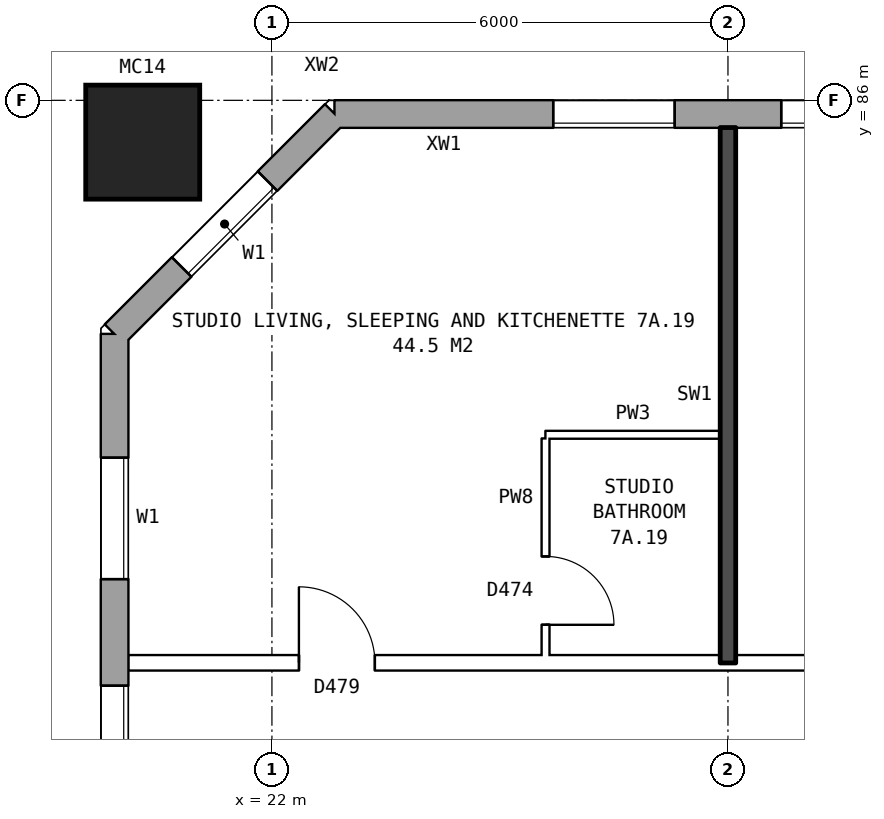
"""IFC4 building model, lengths in metres.
Left out: names, types, materials, properties, quantities, classifications, styles, units other than length and angle.
Written with IfcOpenShell. Run it as: python <this file> out.ifc"""

import sys

from ifc_helpers import new_model, si_unit, direction, frame, frame_2d, origin, origin_2d, place, context, subcontext, project, spatial, rectangle, hollow_rectangle, extrude, element, fill, save


model = new_model("IFC4")
c1 = context("Model", 3, precision=1e-05, world=origin(), true_north=direction((0.0, 1.0)))
c2 = subcontext(c1, "Body", "Model", "MODEL_VIEW")
j1 = project(units=[si_unit("LENGTHUNIT", "METRE"), si_unit("PLANEANGLEUNIT", "RADIAN")], contexts=[c1])
p1 = place(None, origin())
s1 = spatial("IfcSite", under=j1, at=p1, CompositionType="ELEMENT")
p2 = place(p1, origin())
s2 = spatial("IfcBuilding", under=s1, at=p2, CompositionType="ELEMENT")
p3 = place(p2, frame((0.0, 0.0, 28.8)))
s3 = spatial("IfcBuildingStorey", under=s2, at=p3, CompositionType="ELEMENT", Elevation=28.8)
p4 = place(p3, frame((20.3, 85.45, 0.0), z_axis=(0.0, 0.0, 1.0), x_axis=(1.0, 0.0, 0.0)))
e1 = element("IfcColumn", 1, at=p4, inside=s3, PredefinedType="COLUMN", context=c2, shape_type="SweptSolid", body=[
    extrude(hollow_rectangle(XDim=1.5, YDim=1.5, WallThickness=0.08, at=origin_2d()), origin(), (0.0, 0.0, 1.0), 3.1),
])
p5 = place(p3, frame((72.925, 85.82, 0.0), z_axis=(0.0, 0.0, 1.0), x_axis=(-1.0, 0.0, 0.0)))
e2 = element("IfcWall", 2, at=p5, inside=s3, PredefinedType="STANDARD", context=c2, shape_type="SweptSolid", body=[
    extrude(rectangle(XDim=50.101, YDim=0.36, at=frame_2d((25.05, 0.0))), origin(), (0.0, 0.0, 1.0), 2.85),
])
p6 = place(p5, frame((0.625, 0.0, 0.8)))
e3 = element("IfcOpeningElement", 3, at=p6, cuts=e2, PredefinedType="OPENING", context=c2, shape_type="SweptSolid", body=[
    extrude(rectangle(XDim=1.6, YDim=1.8, at=frame_2d((0.8, 0.9))), frame((0.0, 0.19, 0.0), z_axis=(0.0, -1.0, 0.0), x_axis=(1.0, 0.0, 0.0)), (0.0, 0.0, 1.0), 0.38),
])
p7 = place(p5, frame((3.625, 0.0, 0.8)))
e4 = element("IfcOpeningElement", 4, at=p7, cuts=e2, PredefinedType="OPENING", context=c2, shape_type="SweptSolid", body=[
    extrude(rectangle(XDim=1.6, YDim=1.8, at=frame_2d((0.8, 0.9))), frame((0.0, 0.19, 0.0), z_axis=(0.0, -1.0, 0.0), x_axis=(1.0, 0.0, 0.0)), (0.0, 0.0, 1.0), 0.38),
])
p8 = place(p5, frame((6.625, 0.0, 0.8)))
e5 = element("IfcOpeningElement", 5, at=p8, cuts=e2, PredefinedType="OPENING", context=c2, shape_type="SweptSolid", body=[
    extrude(rectangle(XDim=1.6, YDim=1.8, at=frame_2d((0.8, 0.9))), frame((0.0, 0.19, 0.0), z_axis=(0.0, -1.0, 0.0), x_axis=(1.0, 0.0, 0.0)), (0.0, 0.0, 1.0), 0.38),
])
p9 = place(p5, frame((9.625, 0.0, 0.8)))
e6 = element("IfcOpeningElement", 6, at=p9, cuts=e2, PredefinedType="OPENING", context=c2, shape_type="SweptSolid", body=[
    extrude(rectangle(XDim=1.6, YDim=1.8, at=frame_2d((0.8, 0.9))), frame((0.0, 0.19, 0.0), z_axis=(0.0, -1.0, 0.0), x_axis=(1.0, 0.0, 0.0)), (0.0, 0.0, 1.0), 0.38),
])
p10 = place(p5, frame((12.075, 0.0, 1.65)))
e7 = element("IfcOpeningElement", 7, at=p10, cuts=e2, PredefinedType="OPENING", context=c2, shape_type="SweptSolid", body=[
    extrude(rectangle(XDim=1.2, YDim=0.9, at=frame_2d((0.6, 0.45))), frame((0.0, 0.19, 0.0), z_axis=(0.0, -1.0, 0.0), x_axis=(1.0, 0.0, 0.0)), (0.0, 0.0, 1.0), 0.38),
])
p11 = place(p5, frame((15.325, 0.0, 0.8)))
e8 = element("IfcOpeningElement", 8, at=p11, cuts=e2, PredefinedType="OPENING", context=c2, shape_type="SweptSolid", body=[
    extrude(rectangle(XDim=0.6, YDim=1.2, at=frame_2d((0.3, 0.6))), frame((0.0, 0.19, 0.0), z_axis=(0.0, -1.0, 0.0), x_axis=(1.0, 0.0, 0.0)), (0.0, 0.0, 1.0), 0.38),
])
p12 = place(p5, frame((18.625, 0.0, 0.8)))
e9 = element("IfcOpeningElement", 9, at=p12, cuts=e2, PredefinedType="OPENING", context=c2, shape_type="SweptSolid", body=[
    extrude(rectangle(XDim=1.6, YDim=1.8, at=frame_2d((0.8, 0.9))), frame((0.0, 0.19, 0.0), z_axis=(0.0, -1.0, 0.0), x_axis=(1.0, 0.0, 0.0)), (0.0, 0.0, 1.0), 0.38),
])
p13 = place(p5, frame((21.625, 0.0, 0.8)))
e10 = element("IfcOpeningElement", 10, at=p13, cuts=e2, PredefinedType="OPENING", context=c2, shape_type="SweptSolid", body=[
    extrude(rectangle(XDim=1.6, YDim=1.8, at=frame_2d((0.8, 0.9))), frame((0.0, 0.19, 0.0), z_axis=(0.0, -1.0, 0.0), x_axis=(1.0, 0.0, 0.0)), (0.0, 0.0, 1.0), 0.38),
])
p14 = place(p5, frame((24.625, 0.0, 0.8)))
e11 = element("IfcOpeningElement", 11, at=p14, cuts=e2, PredefinedType="OPENING", context=c2, shape_type="SweptSolid", body=[
    extrude(rectangle(XDim=1.6, YDim=1.8, at=frame_2d((0.8, 0.9))), frame((0.0, 0.19, 0.0), z_axis=(0.0, -1.0, 0.0), x_axis=(1.0, 0.0, 0.0)), (0.0, 0.0, 1.0), 0.38),
])
p15 = place(p5, frame((27.625, 0.0, 0.8)))
e12 = element("IfcOpeningElement", 12, at=p15, cuts=e2, PredefinedType="OPENING", context=c2, shape_type="SweptSolid", body=[
    extrude(rectangle(XDim=1.6, YDim=1.8, at=frame_2d((0.8, 0.9))), frame((0.0, 0.19, 0.0), z_axis=(0.0, -1.0, 0.0), x_axis=(1.0, 0.0, 0.0)), (0.0, 0.0, 1.0), 0.38),
])
p16 = place(p5, frame((30.625, 0.0, 0.8)))
e13 = element("IfcOpeningElement", 13, at=p16, cuts=e2, PredefinedType="OPENING", context=c2, shape_type="SweptSolid", body=[
    extrude(rectangle(XDim=1.6, YDim=1.8, at=frame_2d((0.8, 0.9))), frame((0.0, 0.19, 0.0), z_axis=(0.0, -1.0, 0.0), x_axis=(1.0, 0.0, 0.0)), (0.0, 0.0, 1.0), 0.38),
])
p17 = place(p5, frame((33.125, 0.0, 0.8)))
e14 = element("IfcOpeningElement", 14, at=p17, cuts=e2, PredefinedType="OPENING", context=c2, shape_type="SweptSolid", body=[
    extrude(rectangle(XDim=1.2, YDim=1.5, at=frame_2d((0.6, 0.75))), frame((0.0, 0.19, 0.0), z_axis=(0.0, -1.0, 0.0), x_axis=(1.0, 0.0, 0.0)), (0.0, 0.0, 1.0), 0.38),
])
p18 = place(p5, frame((36.675, 0.0, 1.7)))
e15 = element("IfcOpeningElement", 15, at=p18, cuts=e2, PredefinedType="OPENING", context=c2, shape_type="SweptSolid", body=[
    extrude(rectangle(XDim=0.6, YDim=0.9, at=frame_2d((0.3, 0.45))), frame((0.0, 0.19, 0.0), z_axis=(0.0, -1.0, 0.0), x_axis=(1.0, 0.0, 0.0)), (0.0, 0.0, 1.0), 0.38),
])
p19 = place(p5, frame((39.625, 0.0, 0.8)))
e16 = element("IfcOpeningElement", 16, at=p19, cuts=e2, PredefinedType="OPENING", context=c2, shape_type="SweptSolid", body=[
    extrude(rectangle(XDim=1.6, YDim=1.8, at=frame_2d((0.8, 0.9))), frame((0.0, 0.19, 0.0), z_axis=(0.0, -1.0, 0.0), x_axis=(1.0, 0.0, 0.0)), (0.0, 0.0, 1.0), 0.38),
])
p20 = place(p5, frame((42.625, 0.0, 0.8)))
e17 = element("IfcOpeningElement", 17, at=p20, cuts=e2, PredefinedType="OPENING", context=c2, shape_type="SweptSolid", body=[
    extrude(rectangle(XDim=1.6, YDim=1.8, at=frame_2d((0.8, 0.9))), frame((0.0, 0.19, 0.0), z_axis=(0.0, -1.0, 0.0), x_axis=(1.0, 0.0, 0.0)), (0.0, 0.0, 1.0), 0.38),
])
p21 = place(p5, frame((45.625, 0.0, 0.8)))
e18 = element("IfcOpeningElement", 18, at=p21, cuts=e2, PredefinedType="OPENING", context=c2, shape_type="SweptSolid", body=[
    extrude(rectangle(XDim=1.6, YDim=1.8, at=frame_2d((0.8, 0.9))), frame((0.0, 0.19, 0.0), z_axis=(0.0, -1.0, 0.0), x_axis=(1.0, 0.0, 0.0)), (0.0, 0.0, 1.0), 0.38),
])
p22 = place(p5, frame((13.875, 0.0, 0.15)))
e19 = element("IfcOpeningElement", 19, at=p22, cuts=e2, PredefinedType="OPENING", context=c2, shape_type="SweptSolid", body=[
    extrude(rectangle(XDim=0.8, YDim=0.9, at=frame_2d((0.4, 0.45))), frame((0.0, 0.19, 0.0), z_axis=(0.0, -1.0, 0.0), x_axis=(1.0, 0.0, 0.0)), (0.0, 0.0, 1.0), 0.38),
])
p23 = place(p5, frame((16.225, 0.0, 0.8)))
e20 = element("IfcOpeningElement", 20, at=p23, cuts=e2, PredefinedType="OPENING", context=c2, shape_type="SweptSolid", body=[
    extrude(rectangle(XDim=1.4, YDim=1.8, at=frame_2d((0.7, 0.9))), frame((0.0, 0.19, 0.0), z_axis=(0.0, -1.0, 0.0), x_axis=(1.0, 0.0, 0.0)), (0.0, 0.0, 1.0), 0.38),
])
p24 = place(p5, frame((34.625, 0.0, 0.8)))
e21 = element("IfcOpeningElement", 21, at=p24, cuts=e2, PredefinedType="OPENING", context=c2, shape_type="SweptSolid", body=[
    extrude(rectangle(XDim=0.6, YDim=0.9, at=frame_2d((0.3, 0.45))), frame((0.0, 0.19, 0.0), z_axis=(0.0, -1.0, 0.0), x_axis=(1.0, 0.0, 0.0)), (0.0, 0.0, 1.0), 0.38),
])
p25 = place(p5, frame((37.575, 0.0, 1.1)))
e22 = element("IfcOpeningElement", 22, at=p25, cuts=e2, PredefinedType="OPENING", context=c2, shape_type="SweptSolid", body=[
    extrude(rectangle(XDim=1.0, YDim=1.5, at=frame_2d((0.5, 0.75))), frame((0.0, 0.19, 0.0), z_axis=(0.0, -1.0, 0.0), x_axis=(1.0, 0.0, 0.0)), (0.0, 0.0, 1.0), 0.38),
])
p26 = place(p3, frame((22.825, 85.82, 0.0), z_axis=(0.0, 0.0, 1.0), x_axis=(-0.707106781187, -0.707106781187, 0.0)))
e23 = element("IfcWall", 23, at=p26, inside=s3, PredefinedType="STANDARD", context=c2, shape_type="SweptSolid", body=[
    extrude(rectangle(XDim=4.094, YDim=0.36, at=frame_2d((2.047, 0.0))), origin(), (0.0, 0.0, 1.0), 2.85),
])
p27 = place(p26, frame((1.247, 0.0, 0.8)))
e24 = element("IfcOpeningElement", 24, at=p27, cuts=e23, PredefinedType="OPENING", context=c2, shape_type="SweptSolid", body=[
    extrude(rectangle(XDim=1.6, YDim=1.8, at=frame_2d((0.8, 0.9))), frame((0.0, 0.19, 0.0), z_axis=(0.0, -1.0, 0.0), x_axis=(1.0, 0.0, 0.0)), (0.0, 0.0, 1.0), 0.38),
])
p28 = place(p3, frame((19.93, 82.925, 0.0), z_axis=(0.0, 0.0, 1.0), x_axis=(0.0, -1.0, 0.0)))
e25 = element("IfcWall", 25, at=p28, inside=s3, PredefinedType="STANDARD", context=c2, shape_type="SweptSolid", body=[
    extrude(rectangle(XDim=25.851, YDim=0.36, at=frame_2d((12.925, 0.0))), origin(), (0.0, 0.0, 1.0), 2.85),
])
p29 = place(p28, frame((1.625, 0.0, 0.8)))
e26 = element("IfcOpeningElement", 26, at=p29, cuts=e25, PredefinedType="OPENING", context=c2, shape_type="SweptSolid", body=[
    extrude(rectangle(XDim=1.6, YDim=1.8, at=frame_2d((0.8, 0.9))), frame((0.0, 0.19, 0.0), z_axis=(0.0, -1.0, 0.0), x_axis=(1.0, 0.0, 0.0)), (0.0, 0.0, 1.0), 0.38),
])
p30 = place(p28, frame((4.625, 0.0, 0.8)))
e27 = element("IfcOpeningElement", 27, at=p30, cuts=e25, PredefinedType="OPENING", context=c2, shape_type="SweptSolid", body=[
    extrude(rectangle(XDim=1.6, YDim=1.8, at=frame_2d((0.8, 0.9))), frame((0.0, 0.19, 0.0), z_axis=(0.0, -1.0, 0.0), x_axis=(1.0, 0.0, 0.0)), (0.0, 0.0, 1.0), 0.38),
])
p31 = place(p28, frame((6.525, 0.0, 0.8)))
e28 = element("IfcOpeningElement", 28, at=p31, cuts=e25, PredefinedType="OPENING", context=c2, shape_type="SweptSolid", body=[
    extrude(rectangle(XDim=1.0, YDim=1.8, at=frame_2d((0.5, 0.9))), frame((0.0, 0.19, 0.0), z_axis=(0.0, -1.0, 0.0), x_axis=(1.0, 0.0, 0.0)), (0.0, 0.0, 1.0), 0.38),
])
p32 = place(p28, frame((7.825, 0.0, 0.8)))
e29 = element("IfcOpeningElement", 29, at=p32, cuts=e25, PredefinedType="OPENING", context=c2, shape_type="SweptSolid", body=[
    extrude(rectangle(XDim=1.2, YDim=0.9, at=frame_2d((0.6, 0.45))), frame((0.0, 0.19, 0.0), z_axis=(0.0, -1.0, 0.0), x_axis=(1.0, 0.0, 0.0)), (0.0, 0.0, 1.0), 0.38),
])
p33 = place(p28, frame((10.325, 0.0, 1.7)))
e30 = element("IfcOpeningElement", 30, at=p33, cuts=e25, PredefinedType="OPENING", context=c2, shape_type="SweptSolid", body=[
    extrude(rectangle(XDim=1.2, YDim=0.9, at=frame_2d((0.6, 0.45))), frame((0.0, 0.19, 0.0), z_axis=(0.0, -1.0, 0.0), x_axis=(1.0, 0.0, 0.0)), (0.0, 0.0, 1.0), 0.38),
])
p34 = place(p28, frame((11.825, 0.0, 0.8)))
e31 = element("IfcOpeningElement", 31, at=p34, cuts=e25, PredefinedType="OPENING", context=c2, shape_type="SweptSolid", body=[
    extrude(rectangle(XDim=1.6, YDim=1.8, at=frame_2d((0.8, 0.9))), frame((0.0, 0.19, 0.0), z_axis=(0.0, -1.0, 0.0), x_axis=(1.0, 0.0, 0.0)), (0.0, 0.0, 1.0), 0.38),
])
p35 = place(p28, frame((19.625, 0.0, 0.8)))
e32 = element("IfcOpeningElement", 32, at=p35, cuts=e25, PredefinedType="OPENING", context=c2, shape_type="SweptSolid", body=[
    extrude(rectangle(XDim=1.6, YDim=1.8, at=frame_2d((0.8, 0.9))), frame((0.0, 0.19, 0.0), z_axis=(0.0, -1.0, 0.0), x_axis=(1.0, 0.0, 0.0)), (0.0, 0.0, 1.0), 0.38),
])
p36 = place(p28, frame((22.625, 0.0, 0.8)))
e33 = element("IfcOpeningElement", 33, at=p36, cuts=e25, PredefinedType="OPENING", context=c2, shape_type="SweptSolid", body=[
    extrude(rectangle(XDim=1.6, YDim=1.8, at=frame_2d((0.8, 0.9))), frame((0.0, 0.19, 0.0), z_axis=(0.0, -1.0, 0.0), x_axis=(1.0, 0.0, 0.0)), (0.0, 0.0, 1.0), 0.38),
])
p37 = place(p28, frame((13.725, 0.0, 1.1)))
e34 = element("IfcOpeningElement", 34, at=p37, cuts=e25, PredefinedType="OPENING", context=c2, shape_type="SweptSolid", body=[
    extrude(rectangle(XDim=0.8, YDim=1.5, at=frame_2d((0.4, 0.75))), frame((0.0, 0.19, 0.0), z_axis=(0.0, -1.0, 0.0), x_axis=(1.0, 0.0, 0.0)), (0.0, 0.0, 1.0), 0.38),
])
p38 = place(p28, frame((14.825, 0.0, 1.7)))
e35 = element("IfcOpeningElement", 35, at=p38, cuts=e25, PredefinedType="OPENING", context=c2, shape_type="SweptSolid", body=[
    extrude(rectangle(XDim=0.6, YDim=0.9, at=frame_2d((0.3, 0.45))), frame((0.0, 0.19, 0.0), z_axis=(0.0, -1.0, 0.0), x_axis=(1.0, 0.0, 0.0)), (0.0, 0.0, 1.0), 0.38),
])
p39 = place(p28, frame((16.775, 0.0, 0.8)))
e36 = element("IfcOpeningElement", 36, at=p39, cuts=e25, PredefinedType="OPENING", context=c2, shape_type="SweptSolid", body=[
    extrude(rectangle(XDim=1.2, YDim=0.9, at=frame_2d((0.6, 0.45))), frame((0.0, 0.19, 0.0), z_axis=(0.0, -1.0, 0.0), x_axis=(1.0, 0.0, 0.0)), (0.0, 0.0, 1.0), 0.38),
])
p40 = place(p28, frame((18.275, 0.0, 0.8)))
e37 = element("IfcOpeningElement", 37, at=p40, cuts=e25, PredefinedType="OPENING", context=c2, shape_type="SweptSolid", body=[
    extrude(rectangle(XDim=1.0, YDim=1.8, at=frame_2d((0.5, 0.9))), frame((0.0, 0.19, 0.0), z_axis=(0.0, -1.0, 0.0), x_axis=(1.0, 0.0, 0.0)), (0.0, 0.0, 1.0), 0.38),
])
p41 = place(p3, frame((20.11, 78.6, 0.0), z_axis=(0.0, 0.0, 1.0), x_axis=(1.0, 0.0, 0.0)))
e38 = element("IfcWall", 38, at=p41, inside=s3, PredefinedType="PARTITIONING", context=c2, shape_type="SweptSolid", body=[
    extrude(rectangle(XDim=25.79, YDim=0.2, at=frame_2d((12.895, 0.0))), origin(), (0.0, 0.0, 1.0), 2.85),
])
p42 = place(p41, frame((22.34, 0.0, 0.0)))
e39 = element("IfcOpeningElement", 39, at=p42, cuts=e38, PredefinedType="OPENING", context=c2, shape_type="SweptSolid", body=[
    extrude(rectangle(XDim=1.0, YDim=2.1, at=frame_2d((0.5, 1.05))), frame((0.0, 0.11, 0.0), z_axis=(0.0, -1.0, 0.0), x_axis=(1.0, 0.0, 0.0)), (0.0, 0.0, 1.0), 0.22),
])
p43 = place(p41, frame((10.39, 0.0, 0.0)))
e40 = element("IfcOpeningElement", 40, at=p43, cuts=e38, PredefinedType="OPENING", context=c2, shape_type="SweptSolid", body=[
    extrude(rectangle(XDim=1.0, YDim=2.1, at=frame_2d((0.5, 1.05))), frame((0.0, 0.11, 0.0), z_axis=(0.0, -1.0, 0.0), x_axis=(1.0, 0.0, 0.0)), (0.0, 0.0, 1.0), 0.22),
])
p44 = place(p41, frame((2.245, 0.0, 0.0)))
e41 = element("IfcOpeningElement", 41, at=p44, cuts=e38, PredefinedType="OPENING", context=c2, shape_type="SweptSolid", body=[
    extrude(rectangle(XDim=1.0, YDim=2.1, at=frame_2d((0.5, 1.05))), frame((0.0, 0.11, 0.0), z_axis=(0.0, -1.0, 0.0), x_axis=(1.0, 0.0, 0.0)), (0.0, 0.0, 1.0), 0.22),
])
p45 = place(p3, frame((25.6, 81.6, 0.0), z_axis=(0.0, 0.0, 1.0), x_axis=(1.0, 0.0, 0.0)))
e42 = element("IfcWall", 42, at=p45, inside=s3, PredefinedType="PARTITIONING", context=c2, shape_type="SweptSolid", body=[
    extrude(rectangle(XDim=2.3, YDim=0.1, at=frame_2d((1.15, 0.0))), origin(), (0.0, 0.0, 1.0), 2.85),
])
p46 = place(p3, frame((25.6, 78.7, 0.0), z_axis=(0.0, 0.0, 1.0), x_axis=(0.0, 1.0, 0.0)))
e43 = element("IfcWall", 43, at=p46, inside=s3, PredefinedType="PARTITIONING", context=c2, shape_type="SweptSolid", body=[
    extrude(rectangle(XDim=2.85, YDim=0.1, at=frame_2d((1.425, 0.0))), origin(), (0.0, 0.0, 1.0), 2.85),
])
p47 = place(p46, frame((0.4, 0.0, 0.0)))
e44 = element("IfcOpeningElement", 44, at=p47, cuts=e43, PredefinedType="OPENING", context=c2, shape_type="SweptSolid", body=[
    extrude(rectangle(XDim=0.9, YDim=2.1, at=frame_2d((0.45, 1.05))), frame((0.0, 0.06, 0.0), z_axis=(0.0, -1.0, 0.0), x_axis=(1.0, 0.0, 0.0)), (0.0, 0.0, 1.0), 0.12),
])
p48 = place(p3, frame((28.0, 78.6, 0.0), z_axis=(0.0, 0.0, 1.0), x_axis=(0.0, 1.0, 0.0)))
e45 = element("IfcWall", 45, at=p48, inside=s3, PredefinedType="SOLIDWALL", context=c2, shape_type="SweptSolid", body=[
    extrude(rectangle(XDim=7.04, YDim=0.2, at=frame_2d((3.52, 0.0))), origin(), (0.0, 0.0, 1.0), 2.85),
])
p49 = place(p20, origin())
e46 = element("IfcWindow", 46, at=p49, inside=s3, PartitioningType="SINGLE_PANEL", PredefinedType="WINDOW", context=c2, shape_type="SweptSolid", body=[
    extrude(rectangle(XDim=1.6, YDim=1.8, at=frame_2d((0.8, 0.9))), frame((0.0, 0.15, 0.0), z_axis=(0.0, -1.0, 0.0), x_axis=(1.0, 0.0, 0.0)), (0.0, 0.0, 1.0), 0.06),
])
fill(e17, e46)
p50 = place(p21, origin())
e47 = element("IfcWindow", 47, at=p50, inside=s3, PartitioningType="SINGLE_PANEL", PredefinedType="WINDOW", context=c2, shape_type="SweptSolid", body=[
    extrude(rectangle(XDim=1.6, YDim=1.8, at=frame_2d((0.8, 0.9))), frame((0.0, 0.15, 0.0), z_axis=(0.0, -1.0, 0.0), x_axis=(1.0, 0.0, 0.0)), (0.0, 0.0, 1.0), 0.06),
])
fill(e18, e47)
p51 = place(p27, origin())
e48 = element("IfcWindow", 48, at=p51, inside=s3, PartitioningType="SINGLE_PANEL", PredefinedType="WINDOW", context=c2, shape_type="SweptSolid", body=[
    extrude(rectangle(XDim=1.6, YDim=1.8, at=frame_2d((0.8, 0.9))), frame((0.0, 0.15, 0.0), z_axis=(0.0, -1.0, 0.0), x_axis=(1.0, 0.0, 0.0)), (0.0, 0.0, 1.0), 0.06),
])
fill(e24, e48)
p52 = place(p29, origin())
e49 = element("IfcWindow", 49, at=p52, inside=s3, PartitioningType="SINGLE_PANEL", PredefinedType="WINDOW", context=c2, shape_type="SweptSolid", body=[
    extrude(rectangle(XDim=1.6, YDim=1.8, at=frame_2d((0.8, 0.9))), frame((0.0, 0.15, 0.0), z_axis=(0.0, -1.0, 0.0), x_axis=(1.0, 0.0, 0.0)), (0.0, 0.0, 1.0), 0.06),
])
fill(e26, e49)
p53 = place(p30, origin())
e50 = element("IfcWindow", 50, at=p53, inside=s3, PartitioningType="SINGLE_PANEL", PredefinedType="WINDOW", context=c2, shape_type="SweptSolid", body=[
    extrude(rectangle(XDim=1.6, YDim=1.8, at=frame_2d((0.8, 0.9))), frame((0.0, 0.15, 0.0), z_axis=(0.0, -1.0, 0.0), x_axis=(1.0, 0.0, 0.0)), (0.0, 0.0, 1.0), 0.06),
])
fill(e27, e50)
p54 = place(p44, origin())
e51 = element("IfcDoor", 51, at=p54, inside=s3, OperationType="SINGLE_SWING_LEFT", PredefinedType="DOOR", context=c2, shape_type="SweptSolid", body=[
    extrude(rectangle(XDim=1.0, YDim=2.1, at=frame_2d((0.5, 1.05))), frame((0.0, 0.025, 0.0), z_axis=(0.0, -1.0, 0.0), x_axis=(1.0, 0.0, 0.0)), (0.0, 0.0, 1.0), 0.05),
])
fill(e41, e51)
p55 = place(p47, frame((0.9, 0.0, 0.0), z_axis=(0.0, 0.0, 1.0), x_axis=(-1.0, 0.0, 0.0)))
e52 = element("IfcDoor", 52, at=p55, inside=s3, OperationType="SINGLE_SWING_RIGHT", PredefinedType="DOOR", context=c2, shape_type="SweptSolid", body=[
    extrude(rectangle(XDim=0.9, YDim=2.1, at=frame_2d((0.45, 1.05))), frame((0.0, 0.025, 0.0), z_axis=(0.0, -1.0, 0.0), x_axis=(1.0, 0.0, 0.0)), (0.0, 0.0, 1.0), 0.05),
])
fill(e44, e52)
save(model, sys.argv[1])
